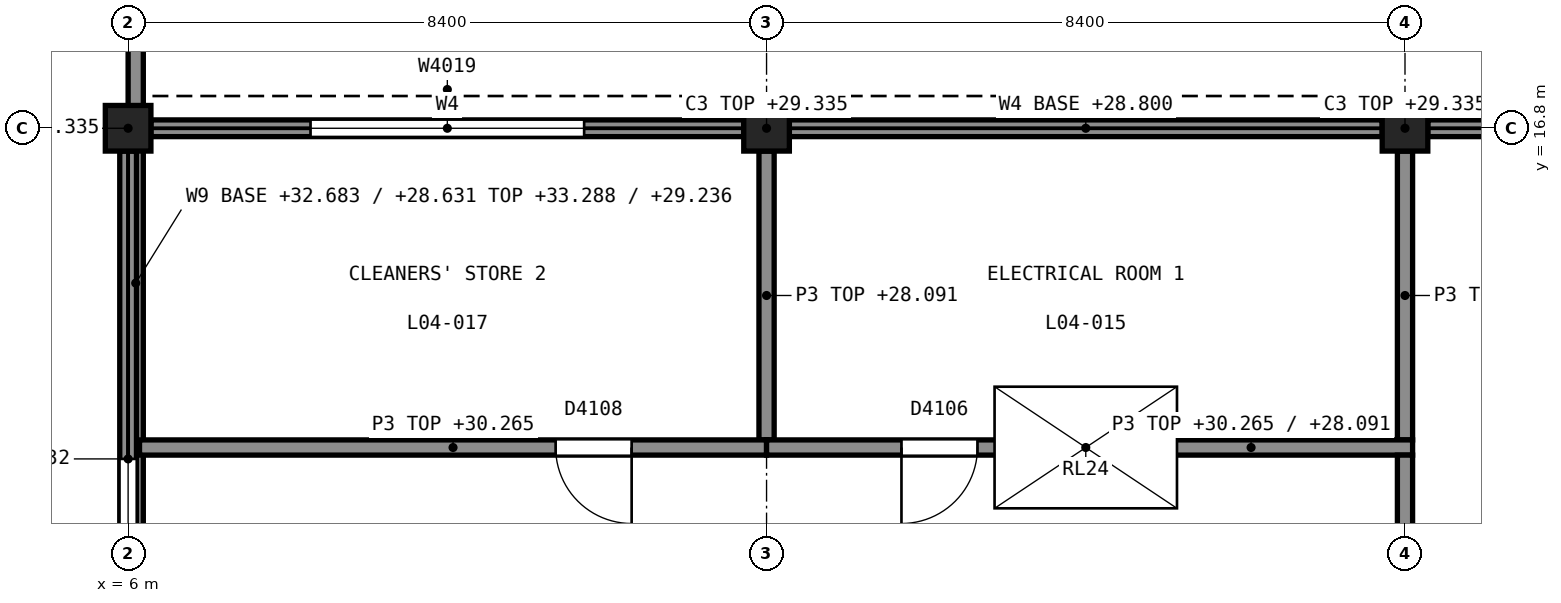
"""IFC4 building model, lengths in metres.
Left out: names, types, materials, properties, quantities, classifications, styles, units other than length and angle.
Written with IfcOpenShell. Run it as: python <this file> out.ifc"""

import sys

from ifc_helpers import new_model, si_unit, direction, frame, frame_2d, origin, origin_2d, place, context, subcontext, project, spatial, polyline, rectangle, outline, extrude, element, fill, save


model = new_model("IFC4")
c1 = context("Model", 3, precision=1e-05, world=origin(), true_north=direction((0.0, 1.0)))
c2 = subcontext(c1, "Body", "Model", "MODEL_VIEW")
j1 = project(units=[si_unit("LENGTHUNIT", "METRE"), si_unit("PLANEANGLEUNIT", "RADIAN")], contexts=[c1])
p1 = place(None, origin())
s1 = spatial("IfcSite", under=j1, at=p1, CompositionType="ELEMENT")
p2 = place(p1, origin())
s2 = spatial("IfcBuilding", under=s1, at=p2, CompositionType="ELEMENT")
p3 = place(p2, frame((0.0, 0.0, 20.0)))
s3 = spatial("IfcBuildingStorey", under=s2, at=p3, CompositionType="ELEMENT", Elevation=20.0)
p4 = place(p3, frame((14.4, 16.9, 0.0), z_axis=(0.0, 0.0, 1.0), x_axis=(1.0, 0.0, 0.0)))
e1 = element("IfcWall", 1, at=p4, inside=s3, PredefinedType="SHEAR", context=c2, shape_type="SweptSolid", body=[
    extrude(rectangle(XDim=8.4, YDim=0.2, at=frame_2d((4.2, 0.0))), origin(), (0.0, 0.0, 1.0), 8.8),
])
p5 = place(p3, frame((14.5, 17.0, 0.0), z_axis=(0.0, 0.0, 1.0), x_axis=(0.0, 1.0, 0.0)))
e2 = element("IfcWall", 2, at=p5, inside=s3, PredefinedType="SHEAR", context=c2, shape_type="SweptSolid", body=[
    extrude(rectangle(XDim=8.0, YDim=0.2, at=frame_2d((4.0, 0.0))), origin(), (0.0, 0.0, 1.0), 6.625),
])
p6 = place(p3, frame((22.7, 17.0, 0.0), z_axis=(0.0, 0.0, 1.0), x_axis=(0.0, 1.0, 0.0)))
e3 = element("IfcWall", 3, at=p6, inside=s3, PredefinedType="SHEAR", context=c2, shape_type="SweptSolid", body=[
    extrude(rectangle(XDim=8.0, YDim=0.2, at=frame_2d((4.0, 0.0))), origin(), (0.0, 0.0, 1.0), 8.775),
])
p7 = place(p3, frame((17.2, 17.0, 0.0), z_axis=(0.0, 0.0, 1.0), x_axis=(0.0, 1.0, 0.0)))
e4 = element("IfcWall", 4, at=p7, inside=s3, PredefinedType="SHEAR", context=c2, shape_type="SweptSolid", body=[
    extrude(rectangle(XDim=5.6, YDim=0.2, at=frame_2d((2.8, 0.0))), origin(), (0.0, 0.0, 1.0), 7.333),
])
p8 = place(p3, frame((20.0, 17.0, 0.0), z_axis=(0.0, 0.0, 1.0), x_axis=(0.0, 1.0, 0.0)))
e5 = element("IfcWall", 5, at=p8, inside=s3, PredefinedType="SHEAR", context=c2, shape_type="SweptSolid", body=[
    extrude(rectangle(XDim=5.6, YDim=0.2, at=frame_2d((2.8, 0.0))), origin(), (0.0, 0.0, 1.0), 8.067),
])
p9 = place(p2, frame((0.0, 0.0, 25.0)))
s4 = spatial("IfcBuildingStorey", under=s2, at=p9, CompositionType="ELEMENT", Elevation=25.0)
for number, where, z_axis, x_axis in (
    (6, (6.0, 16.8, 0.0), (0.0, 0.0, 1.0), (1.0, 0.0, 0.0)),
    (7, (14.4, 16.8, 0.0), (0.0, 0.0, 1.0), (1.0, 0.0, 0.0)),
    (8, (22.8, 16.8, 0.0), (0.0, 0.0, 1.0), (1.0, 0.0, 0.0)),
):
    element("IfcColumn", number, at=place(p9, frame(where, z_axis=z_axis, x_axis=x_axis)), inside=s4, PredefinedType="COLUMN", context=c2, shape_type="SweptSolid", body=[
        extrude(rectangle(XDim=0.6, YDim=0.6, at=origin_2d()), origin(), (0.0, 0.0, 1.0), 4.335),
    ])
p10 = place(p9, frame((23.1, 16.8, 0.0), z_axis=(0.0, 0.0, 1.0), x_axis=(1.0, 0.0, 0.0)))
e9 = element("IfcWall", 9, at=p10, inside=s4, PredefinedType="SOLIDWALL", context=c2, shape_type="SweptSolid", body=[
    extrude(rectangle(XDim=7.8, YDim=0.22, at=frame_2d((3.9, 0.0))), origin(), (0.0, 0.0, 1.0), 4.334),
])
p11 = place(p10, frame((2.1, 0.0, 0.9)))
e10 = element("IfcOpeningElement", 10, at=p11, cuts=e9, PredefinedType="OPENING", context=c2, shape_type="SweptSolid", body=[
    extrude(rectangle(XDim=3.6, YDim=1.5, at=frame_2d((1.8, 0.75))), frame((0.0, 0.12, 0.0), z_axis=(0.0, -1.0, 0.0), x_axis=(1.0, 0.0, 0.0)), (0.0, 0.0, 1.0), 0.24),
])
p12 = place(p9, frame((14.7, 16.8, 3.8), z_axis=(0.0, 0.0, 1.0), x_axis=(1.0, 0.0, 0.0)))
e11 = element("IfcWall", 11, at=p12, inside=s4, PredefinedType="SOLIDWALL", context=c2, shape_type="SweptSolid", body=[
    extrude(rectangle(XDim=7.8, YDim=0.22, at=frame_2d((3.9, 0.0))), origin(), (0.0, 0.0, 1.0), 0.534),
])
p13 = place(p9, frame((6.3, 16.8, 0.0), z_axis=(0.0, 0.0, 1.0), x_axis=(1.0, 0.0, 0.0)))
e12 = element("IfcWall", 12, at=p13, inside=s4, PredefinedType="SOLIDWALL", context=c2, shape_type="SweptSolid", body=[
    extrude(rectangle(XDim=7.8, YDim=0.22, at=frame_2d((3.9, 0.0))), origin(), (0.0, 0.0, 1.0), 4.334),
])
p14 = place(p13, frame((2.1, 0.0, 0.9)))
e13 = element("IfcOpeningElement", 13, at=p14, cuts=e12, PredefinedType="OPENING", context=c2, shape_type="SweptSolid", body=[
    extrude(rectangle(XDim=3.6, YDim=1.5, at=frame_2d((1.8, 0.75))), frame((0.0, 0.12, 0.0), z_axis=(0.0, -1.0, 0.0), x_axis=(1.0, 0.0, 0.0)), (0.0, 0.0, 1.0), 0.24),
])
p15 = place(p9, frame((6.0, 8.4, 0.0), z_axis=(0.0, 0.0, 1.0), x_axis=(0.0, 1.0, 0.0)))
e14 = element("IfcWall", 14, at=p15, inside=s4, PredefinedType="SOLIDWALL", context=c2, shape_type="SweptSolid", body=[
    extrude(outline(polyline([(0.0, 0.0), (8.1, 0.0), (8.1, 4.432), (0.0, 7.096), (0.0, 0.0)])), frame((0.0, 0.11, 0.0), z_axis=(0.0, -1.0, 0.0), x_axis=(1.0, 0.0, 0.0)), (0.0, 0.0, 1.0), 0.22),
])
p16 = place(p15, frame((0.45, 0.0, 0.9)))
e15 = element("IfcOpeningElement", 15, at=p16, cuts=e14, PredefinedType="OPENING", context=c2, shape_type="SweptSolid", body=[
    extrude(rectangle(XDim=3.6, YDim=1.5, at=frame_2d((1.8, 0.75))), frame((0.0, 0.12, 0.0), z_axis=(0.0, -1.0, 0.0), x_axis=(1.0, 0.0, 0.0)), (0.0, 0.0, 1.0), 0.24),
])
p17 = place(p9, frame((6.1, 8.526, 3.631), z_axis=(0.0, 0.0, 1.0), x_axis=(0.0, 1.0, 0.0)))
e16 = element("IfcWall", 16, at=p17, inside=s4, PredefinedType="PARAPET", context=c2, shape_type="SweptSolid", body=[
    extrude(outline(polyline([(0.0, 4.052), (12.474, 0.0), (12.474, 0.605), (0.0, 4.656), (0.0, 4.052)])), frame((0.0, 0.1, 0.0), z_axis=(0.0, -1.0, 0.0), x_axis=(1.0, 0.0, 0.0)), (0.0, 0.0, 1.0), 0.2),
])
for number, where, z_axis, x_axis in (
    (17, (14.4, 12.7, 0.0), (0.0, 0.0, 1.0), (0.0, 1.0, 0.0)),
    (18, (22.8, 12.7, 0.0), (0.0, 0.0, 1.0), (0.0, 1.0, 0.0)),
):
    element("IfcWall", number, at=place(p9, frame(where, z_axis=z_axis, x_axis=x_axis)), inside=s4, PredefinedType="PARTITIONING", context=c2, shape_type="SweptSolid", body=[
        extrude(rectangle(XDim=3.8, YDim=0.2, at=frame_2d((1.9, 0.0))), origin(), (0.0, 0.0, 1.0), 3.091),
    ])
p18 = place(p9, frame((6.15, 12.6, 0.0), z_axis=(0.0, 0.0, 1.0), x_axis=(1.0, 0.0, 0.0)))
e19 = element("IfcWall", 19, at=p18, inside=s4, PredefinedType="PARTITIONING", context=c2, shape_type="SweptSolid", body=[
    extrude(outline(polyline([(0.0, 0.0), (8.25, 0.0), (8.25, 5.265), (3.15, 5.265), (2.1, 4.489), (1.05, 5.265), (0.0, 5.265), (0.0, 0.0)])), frame((0.0, 0.1, 0.0), z_axis=(0.0, -1.0, 0.0), x_axis=(1.0, 0.0, 0.0)), (0.0, 0.0, 1.0), 0.2),
])
p19 = place(p18, frame((5.475, 0.0, 0.0)))
e20 = element("IfcOpeningElement", 20, at=p19, cuts=e19, PredefinedType="OPENING", context=c2, shape_type="SweptSolid", body=[
    extrude(rectangle(XDim=1.0, YDim=2.1, at=frame_2d((0.5, 1.05))), frame((0.0, 0.11, 0.0), z_axis=(0.0, -1.0, 0.0), x_axis=(1.0, 0.0, 0.0)), (0.0, 0.0, 1.0), 0.22),
])
p20 = place(p9, frame((14.4, 12.6, 0.0), z_axis=(0.0, 0.0, 1.0), x_axis=(1.0, 0.0, 0.0)))
e21 = element("IfcWall", 21, at=p20, inside=s4, PredefinedType="PARTITIONING", context=c2, shape_type="SweptSolid", body=[
    extrude(outline(polyline([(0.0, 0.0), (8.5, 0.0), (8.5, 3.091), (8.4, 3.091), (7.35, 5.265), (5.25, 5.265), (4.2, 3.091), (3.15, 5.265), (0.0, 5.265), (0.0, 0.0)])), frame((0.0, 0.1, 0.0), z_axis=(0.0, -1.0, 0.0), x_axis=(1.0, 0.0, 0.0)), (0.0, 0.0, 1.0), 0.2),
])
p21 = place(p20, frame((1.775, 0.0, 0.0)))
e22 = element("IfcOpeningElement", 22, at=p21, cuts=e21, PredefinedType="OPENING", context=c2, shape_type="SweptSolid", body=[
    extrude(rectangle(XDim=1.0, YDim=2.1, at=frame_2d((0.5, 1.05))), frame((0.0, 0.11, 0.0), z_axis=(0.0, -1.0, 0.0), x_axis=(1.0, 0.0, 0.0)), (0.0, 0.0, 1.0), 0.22),
])
p22 = place(p9, frame((22.8, 8.7, 0.0), z_axis=(0.0, 0.0, 1.0), x_axis=(0.0, 1.0, 0.0)))
e23 = element("IfcWall", 23, at=p22, inside=s4, PredefinedType="PARTITIONING", context=c2, shape_type="SweptSolid", body=[
    extrude(rectangle(XDim=3.8, YDim=0.2, at=frame_2d((1.9, 0.0))), origin(), (0.0, 0.0, 1.0), 3.091),
])
p23 = place(p14, origin())
e24 = element("IfcWindow", 24, at=p23, inside=s4, PartitioningType="DOUBLE_PANEL_VERTICAL", PredefinedType="WINDOW", context=c2, shape_type="SweptSolid", body=[
    extrude(rectangle(XDim=3.6, YDim=1.5, at=frame_2d((1.8, 0.75))), frame((0.0, -0.03, 0.0), z_axis=(0.0, -1.0, 0.0), x_axis=(1.0, 0.0, 0.0)), (0.0, 0.0, 1.0), 0.06),
])
fill(e13, e24)
p24 = place(p16, origin())
e25 = element("IfcWindow", 25, at=p24, inside=s4, PartitioningType="DOUBLE_PANEL_VERTICAL", PredefinedType="WINDOW", context=c2, shape_type="SweptSolid", body=[
    extrude(rectangle(XDim=3.6, YDim=1.5, at=frame_2d((1.8, 0.75))), frame((0.0, -0.03, 0.0), z_axis=(0.0, -1.0, 0.0), x_axis=(1.0, 0.0, 0.0)), (0.0, 0.0, 1.0), 0.06),
])
fill(e15, e25)
p25 = place(p9, frame((6.0, 8.4, 7.729), z_axis=(0.0, 0.309015235516, 0.951057087781), x_axis=(1.0, 0.0, 0.0)))
p26 = place(p25, frame((12.6, 4.416, 0.01), z_axis=(0.0, 0.0, -1.0), x_axis=(-1.0, 0.0, 0.0)))
p27 = place(p26, frame((0.0, 0.0, 0.01)))
e26 = element("IfcWindow", 26, at=p27, inside=s4, PartitioningType="SINGLE_PANEL", PredefinedType="SKYLIGHT", context=c2, shape_type="SweptSolid", body=[
    extrude(rectangle(XDim=2.4, YDim=1.6, at=origin_2d()), origin(), (0.0, 0.0, 1.0), 0.05),
])
p28 = place(p21, origin())
e27 = element("IfcDoor", 27, at=p28, inside=s4, OperationType="SINGLE_SWING_LEFT", PredefinedType="DOOR", context=c2, shape_type="SweptSolid", body=[
    extrude(rectangle(XDim=1.0, YDim=2.1, at=frame_2d((0.5, 1.05))), frame((0.0, 0.025, 0.0), z_axis=(0.0, -1.0, 0.0), x_axis=(1.0, 0.0, 0.0)), (0.0, 0.0, 1.0), 0.05),
])
fill(e22, e27)
p29 = place(p19, origin())
e28 = element("IfcDoor", 28, at=p29, inside=s4, OperationType="SINGLE_SWING_RIGHT", PredefinedType="DOOR", context=c2, shape_type="SweptSolid", body=[
    extrude(rectangle(XDim=1.0, YDim=2.1, at=frame_2d((0.5, 1.05))), frame((0.0, 0.025, 0.0), z_axis=(0.0, -1.0, 0.0), x_axis=(1.0, 0.0, 0.0)), (0.0, 0.0, 1.0), 0.05),
])
fill(e20, e28)
save(model, sys.argv[1])
